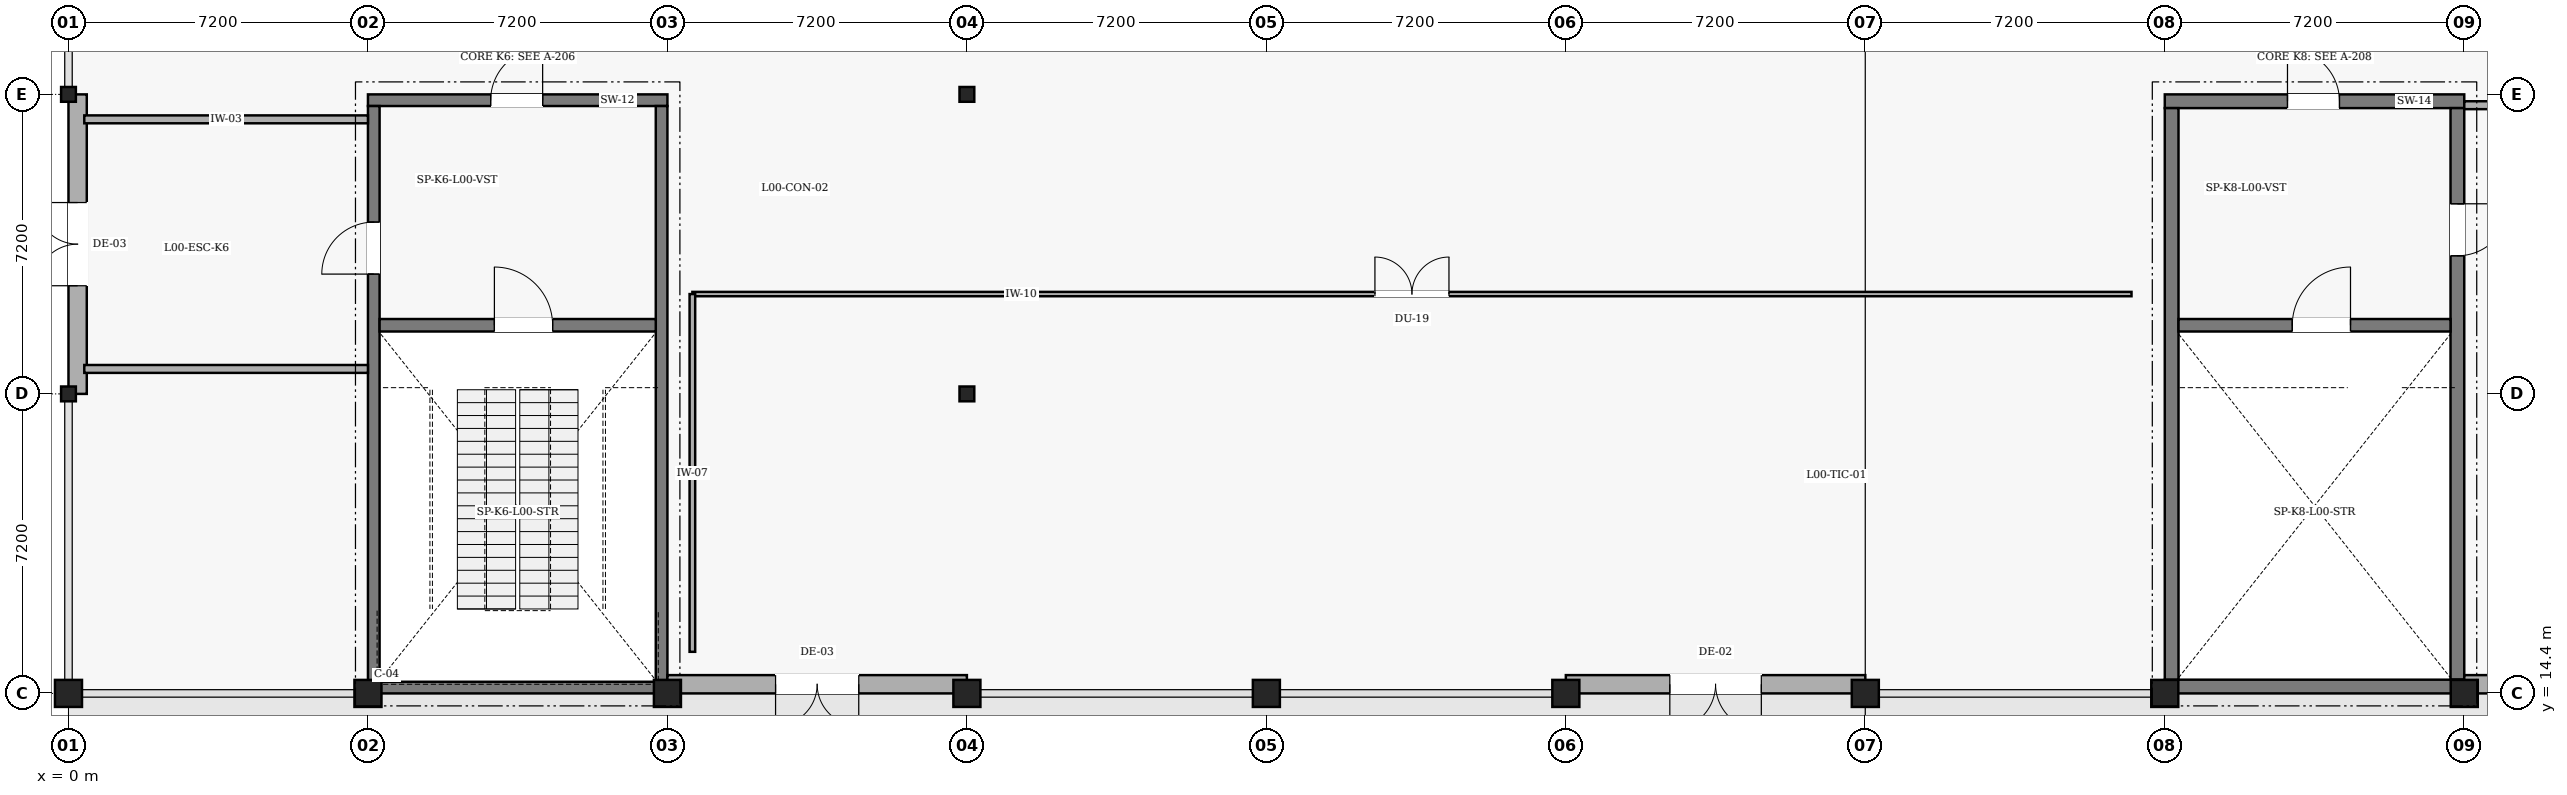
"""IFC4 building model, lengths in metres.
Left out: names, types, materials, properties, quantities, classifications, styles, units other than length and angle.
Written with IfcOpenShell. Run it as: python <this file> out.ifc"""

import sys

from ifc_helpers import new_model, si_unit, direction, frame, frame_2d, origin, origin_2d, place, context, subcontext, project, spatial, rectangle, hollow_circle, extrude, element, fill, save


model = new_model("IFC4")
c1 = context("Model", 3, precision=1e-05, world=origin(), true_north=direction((0.0, 1.0)))
c2 = subcontext(c1, "Body", "Model", "MODEL_VIEW")
j1 = project(units=[si_unit("LENGTHUNIT", "METRE"), si_unit("PLANEANGLEUNIT", "RADIAN")], contexts=[c1])
p1 = place(None, origin())
s1 = spatial("IfcSite", under=j1, at=p1, CompositionType="ELEMENT")
p2 = place(p1, origin())
s2 = spatial("IfcBuilding", under=s1, at=p2, CompositionType="ELEMENT")
p3 = place(p2, origin())
s3 = spatial("IfcBuildingStorey", under=s2, at=p3, CompositionType="ELEMENT", Elevation=0.0)
p4 = place(p3, frame((7.2, 28.66, 0.0), z_axis=(0.0, 0.0, 1.0), x_axis=(1.0, 0.0, 0.0)))
e1 = element("IfcWall", 1, at=p4, inside=s3, PredefinedType="SHEAR", context=c2, shape_type="SweptSolid", body=[
    extrude(rectangle(XDim=7.2, YDim=0.28, at=frame_2d((3.6, 0.0))), origin(), (0.0, 0.0, 1.0), 5.4),
])
p5 = place(p4, frame((2.95, 0.0, 0.0)))
e2 = element("IfcOpeningElement", 2, at=p5, cuts=e1, PredefinedType="OPENING", context=c2, shape_type="SweptSolid", body=[
    extrude(rectangle(XDim=1.25, YDim=2.2, at=frame_2d((0.625, 1.1))), frame((0.0, 0.15, 0.0), z_axis=(0.0, -1.0, 0.0), x_axis=(1.0, 0.0, 0.0)), (0.0, 0.0, 1.0), 0.3),
])
p6 = place(p3, frame((14.26, 28.52, 0.0), z_axis=(0.0, 0.0, 1.0), x_axis=(0.0, -1.0, 0.0)))
e3 = element("IfcWall", 3, at=p6, inside=s3, PredefinedType="SHEAR", context=c2, shape_type="SweptSolid", body=[
    extrude(rectangle(XDim=13.84, YDim=0.28, at=frame_2d((6.92, 0.0))), origin(), (0.0, 0.0, 1.0), 5.4),
])
p7 = place(p3, frame((14.4, 14.54, 0.0), z_axis=(0.0, 0.0, 1.0), x_axis=(-1.0, 0.0, 0.0)))
e4 = element("IfcWall", 4, at=p7, inside=s3, PredefinedType="SHEAR", context=c2, shape_type="SweptSolid", body=[
    extrude(rectangle(XDim=7.2, YDim=0.28, at=frame_2d((3.6, 0.0))), origin(), (0.0, 0.0, 1.0), 5.4),
])
p8 = place(p3, frame((7.34, 14.68, 0.0), z_axis=(0.0, 0.0, 1.0), x_axis=(0.0, 1.0, 0.0)))
e5 = element("IfcWall", 5, at=p8, inside=s3, PredefinedType="SHEAR", context=c2, shape_type="SweptSolid", body=[
    extrude(rectangle(XDim=13.84, YDim=0.28, at=frame_2d((6.92, 0.0))), origin(), (0.0, 0.0, 1.0), 5.4),
])
p9 = place(p8, frame((9.8, 0.0, 0.0)))
e6 = element("IfcOpeningElement", 6, at=p9, cuts=e5, PredefinedType="OPENING", context=c2, shape_type="SweptSolid", body=[
    extrude(rectangle(XDim=1.25, YDim=2.2, at=frame_2d((0.625, 1.1))), frame((0.0, 0.15, 0.0), z_axis=(0.0, -1.0, 0.0), x_axis=(1.0, 0.0, 0.0)), (0.0, 0.0, 1.0), 0.3),
])
p10 = place(p3, frame((7.48, 23.25, 0.0), z_axis=(0.0, 0.0, 1.0), x_axis=(1.0, 0.0, 0.0)))
e7 = element("IfcWall", 7, at=p10, inside=s3, PredefinedType="SHEAR", context=c2, shape_type="SweptSolid", body=[
    extrude(rectangle(XDim=6.64, YDim=0.3, at=frame_2d((3.32, 0.0))), origin(), (0.0, 0.0, 1.0), 5.4),
])
p11 = place(p10, frame((2.76, 0.0, 0.0)))
e8 = element("IfcOpeningElement", 8, at=p11, cuts=e7, PredefinedType="OPENING", context=c2, shape_type="SweptSolid", body=[
    extrude(rectangle(XDim=1.4, YDim=2.2, at=frame_2d((0.7, 1.1))), frame((0.0, 0.16, 0.0), z_axis=(0.0, -1.0, 0.0), x_axis=(1.0, 0.0, 0.0)), (0.0, 0.0, 1.0), 0.32),
])
p12 = place(p3, frame((50.4, 28.635, 0.0), z_axis=(0.0, 0.0, 1.0), x_axis=(1.0, 0.0, 0.0)))
e9 = element("IfcWall", 9, at=p12, inside=s3, PredefinedType="SHEAR", context=c2, shape_type="SweptSolid", body=[
    extrude(rectangle(XDim=7.2, YDim=0.33, at=frame_2d((3.6, 0.0))), origin(), (0.0, 0.0, 1.0), 5.4),
])
p13 = place(p12, frame((2.95, 0.0, 0.0)))
e10 = element("IfcOpeningElement", 10, at=p13, cuts=e9, PredefinedType="OPENING", context=c2, shape_type="SweptSolid", body=[
    extrude(rectangle(XDim=1.25, YDim=2.2, at=frame_2d((0.625, 1.1))), frame((0.0, 0.175, 0.0), z_axis=(0.0, -1.0, 0.0), x_axis=(1.0, 0.0, 0.0)), (0.0, 0.0, 1.0), 0.35),
])
p14 = place(p3, frame((57.435, 28.47, 0.0), z_axis=(0.0, 0.0, 1.0), x_axis=(0.0, -1.0, 0.0)))
e11 = element("IfcWall", 11, at=p14, inside=s3, PredefinedType="SHEAR", context=c2, shape_type="SweptSolid", body=[
    extrude(rectangle(XDim=13.74, YDim=0.33, at=frame_2d((6.87, 0.0))), origin(), (0.0, 0.0, 1.0), 5.4),
])
p15 = place(p14, frame((2.3, 0.0, 0.0)))
e12 = element("IfcOpeningElement", 12, at=p15, cuts=e11, PredefinedType="OPENING", context=c2, shape_type="SweptSolid", body=[
    extrude(rectangle(XDim=1.25, YDim=2.2, at=frame_2d((0.625, 1.1))), frame((0.0, 0.175, 0.0), z_axis=(0.0, -1.0, 0.0), x_axis=(1.0, 0.0, 0.0)), (0.0, 0.0, 1.0), 0.35),
])
p16 = place(p3, frame((57.6, 14.565, 0.0), z_axis=(0.0, 0.0, 1.0), x_axis=(-1.0, 0.0, 0.0)))
e13 = element("IfcWall", 13, at=p16, inside=s3, PredefinedType="SHEAR", context=c2, shape_type="SweptSolid", body=[
    extrude(rectangle(XDim=7.2, YDim=0.33, at=frame_2d((3.6, 0.0))), origin(), (0.0, 0.0, 1.0), 5.4),
])
p17 = place(p3, frame((50.565, 14.73, 0.0), z_axis=(0.0, 0.0, 1.0), x_axis=(0.0, 1.0, 0.0)))
e14 = element("IfcWall", 14, at=p17, inside=s3, PredefinedType="SHEAR", context=c2, shape_type="SweptSolid", body=[
    extrude(rectangle(XDim=13.74, YDim=0.33, at=frame_2d((6.87, 0.0))), origin(), (0.0, 0.0, 1.0), 5.4),
])
p18 = place(p3, frame((50.73, 23.25, 0.0), z_axis=(0.0, 0.0, 1.0), x_axis=(1.0, 0.0, 0.0)))
e15 = element("IfcWall", 15, at=p18, inside=s3, PredefinedType="SHEAR", context=c2, shape_type="SweptSolid", body=[
    extrude(rectangle(XDim=6.54, YDim=0.3, at=frame_2d((3.27, 0.0))), origin(), (0.0, 0.0, 1.0), 5.4),
])
p19 = place(p18, frame((2.735, 0.0, 0.0)))
e16 = element("IfcOpeningElement", 16, at=p19, cuts=e15, PredefinedType="OPENING", context=c2, shape_type="SweptSolid", body=[
    extrude(rectangle(XDim=1.4, YDim=2.2, at=frame_2d((0.7, 1.1))), frame((0.0, 0.16, 0.0), z_axis=(0.0, -1.0, 0.0), x_axis=(1.0, 0.0, 0.0)), (0.0, 0.0, 1.0), 0.32),
])
p20 = place(p3, frame((0.0, 14.4, 0.0), z_axis=(0.0, 0.0, 1.0), x_axis=(1.0, 0.0, 0.0)))
e17 = element("IfcColumn", 17, at=p20, inside=s3, PredefinedType="COLUMN", context=c2, shape_type="SweptSolid", body=[
    extrude(rectangle(XDim=0.65, YDim=0.65, at=origin_2d()), origin(), (0.0, 0.0, 1.0), 5.4),
])
for number, where, z_axis, x_axis in (
    (18, (0.0, 21.6, 0.0), (0.0, 0.0, 1.0), (1.0, 0.0, 0.0)),
    (19, (0.0, 28.8, 0.0), (0.0, 0.0, 1.0), (1.0, 0.0, 0.0)),
):
    element("IfcColumn", number, at=place(p3, frame(where, z_axis=z_axis, x_axis=x_axis)), inside=s3, PredefinedType="COLUMN", context=c2, shape_type="SweptSolid", body=[
        extrude(hollow_circle(Radius=0.178, WallThickness=0.016, at=origin_2d()), origin(), (0.0, 0.0, 1.0), 5.1),
    ])
for number, where, z_axis, x_axis in (
    (20, (7.2, 14.4, 0.0), (0.0, 0.0, 1.0), (1.0, 0.0, 0.0)),
    (21, (14.4, 14.4, 0.0), (0.0, 0.0, 1.0), (1.0, 0.0, 0.0)),
    (22, (21.6, 14.4, 0.0), (0.0, 0.0, 1.0), (1.0, 0.0, 0.0)),
):
    element("IfcColumn", number, at=place(p3, frame(where, z_axis=z_axis, x_axis=x_axis)), inside=s3, PredefinedType="COLUMN", context=c2, shape_type="SweptSolid", body=[
        extrude(rectangle(XDim=0.65, YDim=0.65, at=origin_2d()), origin(), (0.0, 0.0, 1.0), 5.4),
    ])
for number, where, z_axis, x_axis in (
    (23, (21.6, 21.6, 0.0), (0.0, 0.0, 1.0), (1.0, 0.0, 0.0)),
    (24, (21.6, 28.8, 0.0), (0.0, 0.0, 1.0), (1.0, 0.0, 0.0)),
):
    element("IfcColumn", number, at=place(p3, frame(where, z_axis=z_axis, x_axis=x_axis)), inside=s3, PredefinedType="COLUMN", context=c2, shape_type="SweptSolid", body=[
        extrude(hollow_circle(Radius=0.178, WallThickness=0.016, at=origin_2d()), origin(), (0.0, 0.0, 1.0), 5.1),
    ])
for number, where, z_axis, x_axis in (
    (25, (28.8, 14.4, 0.0), (0.0, 0.0, 1.0), (1.0, 0.0, 0.0)),
    (26, (36.0, 14.4, 0.0), (0.0, 0.0, 1.0), (1.0, 0.0, 0.0)),
    (27, (43.2, 14.4, 0.0), (0.0, 0.0, 1.0), (1.0, 0.0, 0.0)),
    (28, (50.4, 14.4, 0.0), (0.0, 0.0, 1.0), (1.0, 0.0, 0.0)),
    (29, (57.6, 14.4, 0.0), (0.0, 0.0, 1.0), (1.0, 0.0, 0.0)),
):
    element("IfcColumn", number, at=place(p3, frame(where, z_axis=z_axis, x_axis=x_axis)), inside=s3, PredefinedType="COLUMN", context=c2, shape_type="SweptSolid", body=[
        extrude(rectangle(XDim=0.65, YDim=0.65, at=origin_2d()), origin(), (0.0, 0.0, 1.0), 5.4),
    ])
p21 = place(p3, frame((0.22, 21.6, 0.0), z_axis=(0.0, 0.0, 1.0), x_axis=(0.0, 1.0, 0.0)))
e30 = element("IfcWall", 30, at=p21, inside=s3, PredefinedType="SOLIDWALL", context=c2, shape_type="SweptSolid", body=[
    extrude(rectangle(XDim=7.2, YDim=0.44, at=frame_2d((3.6, 0.0))), origin(), (0.0, 0.0, 1.0), 4.77),
])
p22 = place(p21, frame((2.6, 0.0, 0.0)))
e31 = element("IfcOpeningElement", 31, at=p22, cuts=e30, PredefinedType="OPENING", context=c2, shape_type="SweptSolid", body=[
    extrude(rectangle(XDim=2.0, YDim=2.3, at=frame_2d((1.0, 1.15))), frame((0.0, 0.23, 0.0), z_axis=(0.0, -1.0, 0.0), x_axis=(1.0, 0.0, 0.0)), (0.0, 0.0, 1.0), 0.46),
])
p23 = place(p3, frame((64.8, 14.62, 0.0), z_axis=(0.0, 0.0, 1.0), x_axis=(-1.0, 0.0, 0.0)))
e32 = element("IfcWall", 32, at=p23, inside=s3, PredefinedType="SOLIDWALL", context=c2, shape_type="SweptSolid", body=[
    extrude(rectangle(XDim=7.2, YDim=0.44, at=frame_2d((3.6, 0.0))), origin(), (0.0, 0.0, 1.0), 5.1),
])
p24 = place(p23, frame((2.4, 0.0, 0.0)))
e33 = element("IfcOpeningElement", 33, at=p24, cuts=e32, PredefinedType="OPENING", context=c2, shape_type="SweptSolid", body=[
    extrude(rectangle(XDim=2.4, YDim=2.5, at=frame_2d((1.2, 1.25))), frame((0.0, 0.23, 0.0), z_axis=(0.0, -1.0, 0.0), x_axis=(1.0, 0.0, 0.0)), (0.0, 0.0, 1.0), 0.46),
])
p25 = place(p3, frame((43.2, 14.62, 0.0), z_axis=(0.0, 0.0, 1.0), x_axis=(-1.0, 0.0, 0.0)))
e34 = element("IfcWall", 34, at=p25, inside=s3, PredefinedType="SOLIDWALL", context=c2, shape_type="SweptSolid", body=[
    extrude(rectangle(XDim=7.2, YDim=0.44, at=frame_2d((3.6, 0.0))), origin(), (0.0, 0.0, 1.0), 5.1),
])
p26 = place(p25, frame((2.5, 0.0, 0.0)))
e35 = element("IfcOpeningElement", 35, at=p26, cuts=e34, PredefinedType="OPENING", context=c2, shape_type="SweptSolid", body=[
    extrude(rectangle(XDim=2.2, YDim=2.4, at=frame_2d((1.1, 1.2))), frame((0.0, 0.23, 0.0), z_axis=(0.0, -1.0, 0.0), x_axis=(1.0, 0.0, 0.0)), (0.0, 0.0, 1.0), 0.46),
])
p27 = place(p3, frame((21.6, 14.62, 0.0), z_axis=(0.0, 0.0, 1.0), x_axis=(-1.0, 0.0, 0.0)))
e36 = element("IfcWall", 36, at=p27, inside=s3, PredefinedType="SOLIDWALL", context=c2, shape_type="SweptSolid", body=[
    extrude(rectangle(XDim=7.2, YDim=0.44, at=frame_2d((3.6, 0.0))), origin(), (0.0, 0.0, 1.0), 4.8),
])
p28 = place(p27, frame((2.6, 0.0, 0.0)))
e37 = element("IfcOpeningElement", 37, at=p28, cuts=e36, PredefinedType="OPENING", context=c2, shape_type="SweptSolid", body=[
    extrude(rectangle(XDim=2.0, YDim=2.3, at=frame_2d((1.0, 1.15))), frame((0.0, 0.23, 0.0), z_axis=(0.0, -1.0, 0.0), x_axis=(1.0, 0.0, 0.0)), (0.0, 0.0, 1.0), 0.46),
])
p29 = place(p3, frame((15.0, 24.0, 0.0), z_axis=(0.0, 0.0, 1.0), x_axis=(1.0, 0.0, 0.0)))
e38 = element("IfcWall", 38, at=p29, inside=s3, PredefinedType="PARTITIONING", context=c2, shape_type="SweptSolid", body=[
    extrude(rectangle(XDim=34.6, YDim=0.105, at=frame_2d((17.3, 0.0))), origin(), (0.0, 0.0, 1.0), 4.8),
])
p30 = place(p29, frame((16.41, 0.0, 0.0)))
e39 = element("IfcOpeningElement", 39, at=p30, cuts=e38, PredefinedType="OPENING", context=c2, shape_type="SweptSolid", body=[
    extrude(rectangle(XDim=1.78, YDim=2.28, at=frame_2d((0.89, 1.14))), frame((0.0, 0.062, 0.0), z_axis=(0.0, -1.0, 0.0), x_axis=(1.0, 0.0, 0.0)), (0.0, 0.0, 1.0), 0.125),
])
p31 = place(p3, frame((15.0, 15.4, 0.0), z_axis=(0.0, 0.0, 1.0), x_axis=(0.0, 1.0, 0.0)))
e40 = element("IfcWall", 40, at=p31, inside=s3, PredefinedType="PARTITIONING", context=c2, shape_type="SweptSolid", body=[
    extrude(rectangle(XDim=8.6, YDim=0.135, at=frame_2d((4.3, 0.0))), origin(), (0.0, 0.0, 1.0), 4.65),
])
for number, where, z_axis, x_axis in (
    (41, (0.38, 28.2, 0.0), (0.0, 0.0, 1.0), (1.0, 0.0, 0.0)),
    (42, (7.2, 22.2, 0.0), (0.0, 0.0, 1.0), (-1.0, 0.0, 0.0)),
):
    element("IfcWall", number, at=place(p3, frame(where, z_axis=z_axis, x_axis=x_axis)), inside=s3, PredefinedType="PARTITIONING", context=c2, shape_type="SweptSolid", body=[
        extrude(rectangle(XDim=6.82, YDim=0.19, at=frame_2d((3.41, 0.0))), origin(), (0.0, 0.0, 1.0), 5.05),
    ])
p32 = place(p3, frame((57.6, 28.54, 0.0), z_axis=(0.0, 0.0, 1.0), x_axis=(1.0, 0.0, 0.0)))
e43 = element("IfcWall", 43, at=p32, inside=s3, PredefinedType="PARTITIONING", context=c2, shape_type="SweptSolid", body=[
    extrude(rectangle(XDim=5.945, YDim=0.19, at=frame_2d((2.972, 0.0))), origin(), (0.0, 0.0, 1.0), 5.05),
])
p33 = place(p22, origin())
e44 = element("IfcDoor", 44, at=p33, inside=s3, OperationType="DOUBLE_DOOR_SINGLE_SWING", PredefinedType="DOOR", context=c2, shape_type="SweptSolid", body=[
    extrude(rectangle(XDim=2.0, YDim=2.3, at=frame_2d((1.0, 1.15))), frame((0.0, 0.025, 0.0), z_axis=(0.0, -1.0, 0.0), x_axis=(1.0, 0.0, 0.0)), (0.0, 0.0, 1.0), 0.05),
])
fill(e31, e44)
p34 = place(p26, origin())
e45 = element("IfcDoor", 45, at=p34, inside=s3, OperationType="DOUBLE_DOOR_SINGLE_SWING", PredefinedType="DOOR", context=c2, shape_type="SweptSolid", body=[
    extrude(rectangle(XDim=2.2, YDim=2.4, at=frame_2d((1.1, 1.2))), frame((0.0, 0.025, 0.0), z_axis=(0.0, -1.0, 0.0), x_axis=(1.0, 0.0, 0.0)), (0.0, 0.0, 1.0), 0.05),
])
fill(e35, e45)
p35 = place(p28, origin())
e46 = element("IfcDoor", 46, at=p35, inside=s3, OperationType="DOUBLE_DOOR_SINGLE_SWING", PredefinedType="DOOR", context=c2, shape_type="SweptSolid", body=[
    extrude(rectangle(XDim=2.0, YDim=2.3, at=frame_2d((1.0, 1.15))), frame((0.0, 0.025, 0.0), z_axis=(0.0, -1.0, 0.0), x_axis=(1.0, 0.0, 0.0)), (0.0, 0.0, 1.0), 0.05),
])
fill(e37, e46)
p36 = place(p11, origin())
e47 = element("IfcDoor", 47, at=p36, inside=s3, OperationType="SINGLE_SWING_LEFT", PredefinedType="DOOR", context=c2, shape_type="SweptSolid", body=[
    extrude(rectangle(XDim=1.4, YDim=2.2, at=frame_2d((0.7, 1.1))), frame((0.0, 0.025, 0.0), z_axis=(0.0, -1.0, 0.0), x_axis=(1.0, 0.0, 0.0)), (0.0, 0.0, 1.0), 0.05),
])
fill(e8, e47)
p37 = place(p5, origin())
e48 = element("IfcDoor", 48, at=p37, inside=s3, OperationType="SINGLE_SWING_RIGHT", PredefinedType="DOOR", context=c2, shape_type="SweptSolid", body=[
    extrude(rectangle(XDim=1.25, YDim=2.2, at=frame_2d((0.625, 1.1))), frame((0.0, 0.025, 0.0), z_axis=(0.0, -1.0, 0.0), x_axis=(1.0, 0.0, 0.0)), (0.0, 0.0, 1.0), 0.05),
])
fill(e2, e48)
p38 = place(p9, origin())
e49 = element("IfcDoor", 49, at=p38, inside=s3, OperationType="SINGLE_SWING_LEFT", PredefinedType="DOOR", context=c2, shape_type="SweptSolid", body=[
    extrude(rectangle(XDim=1.25, YDim=2.2, at=frame_2d((0.625, 1.1))), frame((0.0, 0.025, 0.0), z_axis=(0.0, -1.0, 0.0), x_axis=(1.0, 0.0, 0.0)), (0.0, 0.0, 1.0), 0.05),
])
fill(e6, e49)
p39 = place(p19, origin())
e50 = element("IfcDoor", 50, at=p39, inside=s3, OperationType="SINGLE_SWING_RIGHT", PredefinedType="DOOR", context=c2, shape_type="SweptSolid", body=[
    extrude(rectangle(XDim=1.4, YDim=2.2, at=frame_2d((0.7, 1.1))), frame((0.0, 0.025, 0.0), z_axis=(0.0, -1.0, 0.0), x_axis=(1.0, 0.0, 0.0)), (0.0, 0.0, 1.0), 0.05),
])
fill(e16, e50)
p40 = place(p13, origin())
e51 = element("IfcDoor", 51, at=p40, inside=s3, OperationType="SINGLE_SWING_LEFT", PredefinedType="DOOR", context=c2, shape_type="SweptSolid", body=[
    extrude(rectangle(XDim=1.25, YDim=2.2, at=frame_2d((0.625, 1.1))), frame((0.0, 0.025, 0.0), z_axis=(0.0, -1.0, 0.0), x_axis=(1.0, 0.0, 0.0)), (0.0, 0.0, 1.0), 0.05),
])
fill(e10, e51)
p41 = place(p30, origin())
e52 = element("IfcDoor", 52, at=p41, inside=s3, OperationType="DOUBLE_DOOR_SINGLE_SWING", PredefinedType="DOOR", context=c2, shape_type="SweptSolid", body=[
    extrude(rectangle(XDim=1.78, YDim=2.28, at=frame_2d((0.89, 1.14))), frame((0.0, 0.025, 0.0), z_axis=(0.0, -1.0, 0.0), x_axis=(1.0, 0.0, 0.0)), (0.0, 0.0, 1.0), 0.05),
])
fill(e39, e52)
p42 = place(p15, origin())
e53 = element("IfcDoor", 53, at=p42, inside=s3, OperationType="SINGLE_SWING_LEFT", PredefinedType="DOOR", context=c2, shape_type="SweptSolid", body=[
    extrude(rectangle(XDim=1.25, YDim=2.2, at=frame_2d((0.625, 1.1))), frame((0.0, 0.025, 0.0), z_axis=(0.0, -1.0, 0.0), x_axis=(1.0, 0.0, 0.0)), (0.0, 0.0, 1.0), 0.05),
])
fill(e12, e53)
save(model, sys.argv[1])
